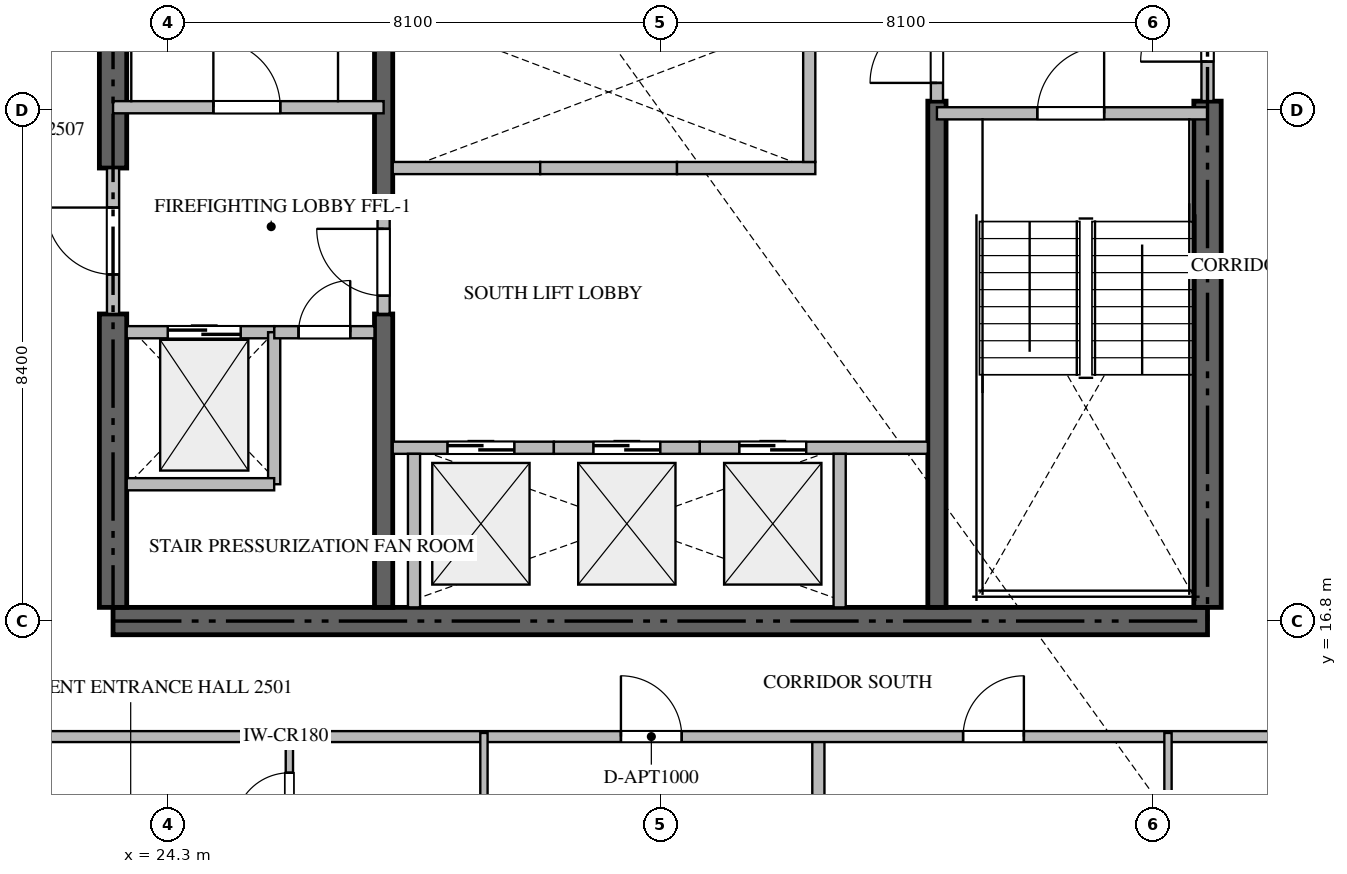
"""IFC4 building model, lengths in metres.
Left out: names, types, materials, properties, quantities, classifications, styles, units other than length and angle.
Written with IfcOpenShell. Run it as: python <this file> out.ifc"""

import sys

from ifc_helpers import new_model, si_unit, direction, frame, frame_2d, origin, place, context, subcontext, project, spatial, rectangle, extrude, source, transform, mapped, element, fill, save


model = new_model("IFC4")
c1 = context("Model", 3, precision=1e-05, world=origin(), true_north=direction((0.0, 1.0)))
c2 = subcontext(c1, "Body", "Model", "MODEL_VIEW")
j1 = project(units=[si_unit("LENGTHUNIT", "METRE"), si_unit("PLANEANGLEUNIT", "RADIAN")], contexts=[c1])
p1 = place(None, origin())
s1 = spatial("IfcSite", under=j1, at=p1, CompositionType="ELEMENT")
p2 = place(p1, origin())
s2 = spatial("IfcBuilding", under=s1, at=p2, CompositionType="ELEMENT")
p3 = place(p2, frame((0.0, 0.0, 101.7)))
s3 = spatial("IfcBuildingStorey", under=s2, at=p3, CompositionType="ELEMENT", Elevation=101.7)
p4 = place(p3, frame((23.4, 16.8, -0.26), z_axis=(0.0, 0.0, 1.0), x_axis=(1.0, 0.0, 0.0)))
e1 = element("IfcWall", 1, at=p4, inside=s3, PredefinedType="SHEAR", context=c2, shape_type="SweptSolid", body=[
    extrude(rectangle(XDim=18.0, YDim=0.45, at=frame_2d((9.0, 0.0))), origin(), (0.0, 0.0, 1.0), 3.748),
])
p5 = place(p3, frame((23.4, 17.025, -0.26), z_axis=(0.0, 0.0, 1.0), x_axis=(0.0, 1.0, 0.0)))
e2 = element("IfcWall", 2, at=p5, inside=s3, PredefinedType="SHEAR", context=c2, shape_type="SweptSolid", body=[
    extrude(rectangle(XDim=4.825, YDim=0.45, at=frame_2d((2.413, 0.0))), origin(), (0.0, 0.0, 1.0), 3.748),
])
p6 = place(p3, frame((23.4, 24.25, -0.26), z_axis=(0.0, 0.0, 1.0), x_axis=(0.0, 1.0, 0.0)))
e3 = element("IfcWall", 3, at=p6, inside=s3, PredefinedType="SHEAR", context=c2, shape_type="SweptSolid", body=[
    extrude(rectangle(XDim=9.125, YDim=0.45, at=frame_2d((4.562, 0.0))), origin(), (0.0, 0.0, 1.0), 3.748),
])
p7 = place(p3, frame((41.4, 17.025, -0.26), z_axis=(0.0, 0.0, 1.0), x_axis=(0.0, 1.0, 0.0)))
e4 = element("IfcWall", 4, at=p7, inside=s3, PredefinedType="SHEAR", context=c2, shape_type="SweptSolid", body=[
    extrude(rectangle(XDim=8.325, YDim=0.45, at=frame_2d((4.163, 0.0))), origin(), (0.0, 0.0, 1.0), 3.748),
])
p8 = place(p3, frame((27.85, 17.025, -0.26), z_axis=(0.0, 0.0, 1.0), x_axis=(0.0, 1.0, 0.0)))
e5 = element("IfcWall", 5, at=p8, inside=s3, PredefinedType="SHEAR", context=c2, shape_type="SweptSolid", body=[
    extrude(rectangle(XDim=4.825, YDim=0.3, at=frame_2d((2.413, 0.0))), origin(), (0.0, 0.0, 1.0), 3.748),
])
p9 = place(p3, frame((27.85, 23.55, -0.26), z_axis=(0.0, 0.0, 1.0), x_axis=(0.0, 1.0, 0.0)))
e6 = element("IfcWall", 6, at=p9, inside=s3, PredefinedType="SHEAR", context=c2, shape_type="SweptSolid", body=[
    extrude(rectangle(XDim=9.825, YDim=0.3, at=frame_2d((4.913, 0.0))), origin(), (0.0, 0.0, 1.0), 3.748),
])
p10 = place(p3, frame((36.95, 17.025, -0.26), z_axis=(0.0, 0.0, 1.0), x_axis=(0.0, 1.0, 0.0)))
e7 = element("IfcWall", 7, at=p10, inside=s3, PredefinedType="SHEAR", context=c2, shape_type="SweptSolid", body=[
    extrude(rectangle(XDim=8.325, YDim=0.3, at=frame_2d((4.163, 0.0))), origin(), (0.0, 0.0, 1.0), 3.748),
])
p11 = place(p3, frame((23.4, 25.25, 0.0), z_axis=(0.0, 0.0, 1.0), x_axis=(1.0, 0.0, 0.0)))
e8 = element("IfcWall", 8, at=p11, inside=s3, PredefinedType="STANDARD", context=c2, shape_type="SweptSolid", body=[
    extrude(rectangle(XDim=4.45, YDim=0.2, at=frame_2d((2.225, 0.0))), origin(), (0.0, 0.0, 1.0), 3.49),
])
p12 = place(p11, frame((1.65, 0.0, 0.0)))
e9 = element("IfcOpeningElement", 9, at=p12, cuts=e8, PredefinedType="OPENING", context=c2, shape_type="SweptSolid", body=[
    extrude(rectangle(XDim=1.1, YDim=2.15, at=frame_2d((0.55, 1.075))), frame((0.0, 0.11, 0.0), z_axis=(0.0, -1.0, 0.0), x_axis=(1.0, 0.0, 0.0)), (0.0, 0.0, 1.0), 0.22),
])
p13 = place(p3, frame((36.95, 25.15, 0.0), z_axis=(0.0, 0.0, 1.0), x_axis=(1.0, 0.0, 0.0)))
e10 = element("IfcWall", 10, at=p13, inside=s3, PredefinedType="STANDARD", context=c2, shape_type="SweptSolid", body=[
    extrude(rectangle(XDim=4.45, YDim=0.2, at=frame_2d((2.225, 0.0))), origin(), (0.0, 0.0, 1.0), 3.49),
])
p14 = place(p13, frame((1.65, 0.0, 0.0)))
e11 = element("IfcOpeningElement", 11, at=p14, cuts=e10, PredefinedType="OPENING", context=c2, shape_type="SweptSolid", body=[
    extrude(rectangle(XDim=1.1, YDim=2.15, at=frame_2d((0.55, 1.075))), frame((0.0, 0.11, 0.0), z_axis=(0.0, -1.0, 0.0), x_axis=(1.0, 0.0, 0.0)), (0.0, 0.0, 1.0), 0.22),
])
p15 = place(p3, frame((23.625, 21.55, 0.0), z_axis=(0.0, 0.0, 1.0), x_axis=(1.0, 0.0, 0.0)))
e12 = element("IfcWall", 12, at=p15, inside=s3, PredefinedType="STANDARD", context=c2, shape_type="SweptSolid", body=[
    extrude(rectangle(XDim=2.425, YDim=0.2, at=frame_2d((1.212, 0.0))), origin(), (0.0, 0.0, 1.0), 3.49),
])
p16 = place(p15, frame((0.675, 0.0, 0.0)))
e13 = element("IfcOpeningElement", 13, at=p16, cuts=e12, PredefinedType="OPENING", context=c2, shape_type="SweptSolid", body=[
    extrude(rectangle(XDim=1.2, YDim=2.2, at=frame_2d((0.6, 1.1))), frame((0.0, 0.11, 0.0), z_axis=(0.0, -1.0, 0.0), x_axis=(1.0, 0.0, 0.0)), (0.0, 0.0, 1.0), 0.22),
])
p17 = place(p3, frame((28.0, 19.65, 0.0), z_axis=(0.0, 0.0, 1.0), x_axis=(1.0, 0.0, 0.0)))
e14 = element("IfcWall", 14, at=p17, inside=s3, PredefinedType="STANDARD", context=c2, shape_type="SweptSolid", body=[
    extrude(rectangle(XDim=2.65, YDim=0.2, at=frame_2d((1.325, 0.0))), origin(), (0.0, 0.0, 1.0), 3.49),
])
p18 = place(p17, frame((0.9, 0.0, 0.0)))
e15 = element("IfcOpeningElement", 15, at=p18, cuts=e14, PredefinedType="OPENING", context=c2, shape_type="SweptSolid", body=[
    extrude(rectangle(XDim=1.1, YDim=2.2, at=frame_2d((0.55, 1.1))), frame((0.0, 0.11, 0.0), z_axis=(0.0, -1.0, 0.0), x_axis=(1.0, 0.0, 0.0)), (0.0, 0.0, 1.0), 0.22),
])
p19 = place(p3, frame((28.35, 17.025, 0.0), z_axis=(0.0, 0.0, 1.0), x_axis=(0.0, 1.0, 0.0)))
e16 = element("IfcWall", 16, at=p19, inside=s3, PredefinedType="STANDARD", context=c2, shape_type="SweptSolid", body=[
    extrude(rectangle(XDim=2.525, YDim=0.2, at=frame_2d((1.263, 0.0))), origin(), (0.0, 0.0, 1.0), 3.49),
])
p20 = place(p3, frame((30.65, 19.65, 0.0), z_axis=(0.0, 0.0, 1.0), x_axis=(1.0, 0.0, 0.0)))
e17 = element("IfcWall", 17, at=p20, inside=s3, PredefinedType="STANDARD", context=c2, shape_type="SweptSolid", body=[
    extrude(rectangle(XDim=2.4, YDim=0.2, at=frame_2d((1.2, 0.0))), origin(), (0.0, 0.0, 1.0), 3.49),
])
p21 = place(p20, frame((0.65, 0.0, 0.0)))
e18 = element("IfcOpeningElement", 18, at=p21, cuts=e17, PredefinedType="OPENING", context=c2, shape_type="SweptSolid", body=[
    extrude(rectangle(XDim=1.1, YDim=2.2, at=frame_2d((0.55, 1.1))), frame((0.0, 0.11, 0.0), z_axis=(0.0, -1.0, 0.0), x_axis=(1.0, 0.0, 0.0)), (0.0, 0.0, 1.0), 0.22),
])
p22 = place(p3, frame((33.05, 19.65, 0.0), z_axis=(0.0, 0.0, 1.0), x_axis=(1.0, 0.0, 0.0)))
e19 = element("IfcWall", 19, at=p22, inside=s3, PredefinedType="STANDARD", context=c2, shape_type="SweptSolid", body=[
    extrude(rectangle(XDim=3.75, YDim=0.2, at=frame_2d((1.875, 0.0))), origin(), (0.0, 0.0, 1.0), 3.49),
])
p23 = place(p22, frame((0.65, 0.0, 0.0)))
e20 = element("IfcOpeningElement", 20, at=p23, cuts=e19, PredefinedType="OPENING", context=c2, shape_type="SweptSolid", body=[
    extrude(rectangle(XDim=1.1, YDim=2.2, at=frame_2d((0.55, 1.1))), frame((0.0, 0.11, 0.0), z_axis=(0.0, -1.0, 0.0), x_axis=(1.0, 0.0, 0.0)), (0.0, 0.0, 1.0), 0.22),
])
p24 = place(p3, frame((35.35, 17.025, 0.0), z_axis=(0.0, 0.0, 1.0), x_axis=(0.0, 1.0, 0.0)))
e21 = element("IfcWall", 21, at=p24, inside=s3, PredefinedType="STANDARD", context=c2, shape_type="SweptSolid", body=[
    extrude(rectangle(XDim=2.525, YDim=0.2, at=frame_2d((1.263, 0.0))), origin(), (0.0, 0.0, 1.0), 3.49),
])
p25 = place(p3, frame((28.0, 24.25, 0.0), z_axis=(0.0, 0.0, 1.0), x_axis=(1.0, 0.0, 0.0)))
e22 = element("IfcWall", 22, at=p25, inside=s3, PredefinedType="STANDARD", context=c2, shape_type="SweptSolid", body=[
    extrude(rectangle(XDim=2.425, YDim=0.2, at=frame_2d((1.212, 0.0))), origin(), (0.0, 0.0, 1.0), 3.49),
])
p26 = place(p3, frame((30.425, 24.25, 0.0), z_axis=(0.0, 0.0, 1.0), x_axis=(1.0, 0.0, 0.0)))
e23 = element("IfcWall", 23, at=p26, inside=s3, PredefinedType="STANDARD", context=c2, shape_type="SweptSolid", body=[
    extrude(rectangle(XDim=2.25, YDim=0.2, at=frame_2d((1.125, 0.0))), origin(), (0.0, 0.0, 1.0), 3.49),
])
p27 = place(p3, frame((32.675, 24.25, 0.0), z_axis=(0.0, 0.0, 1.0), x_axis=(1.0, 0.0, 0.0)))
e24 = element("IfcWall", 24, at=p27, inside=s3, PredefinedType="STANDARD", context=c2, shape_type="SweptSolid", body=[
    extrude(rectangle(XDim=2.275, YDim=0.2, at=frame_2d((1.137, 0.0))), origin(), (0.0, 0.0, 1.0), 3.49),
])
for number, where, z_axis, x_axis in (
    (25, (34.85, 24.35, 0.0), (0.0, 0.0, 1.0), (0.0, 1.0, 0.0)),
    (26, (26.05, 19.05, 0.0), (0.0, 0.0, 1.0), (0.0, 1.0, 0.0)),
):
    element("IfcWall", number, at=place(p3, frame(where, z_axis=z_axis, x_axis=x_axis)), inside=s3, PredefinedType="STANDARD", context=c2, shape_type="SweptSolid", body=[
        extrude(rectangle(XDim=2.5, YDim=0.2, at=frame_2d((1.25, 0.0))), origin(), (0.0, 0.0, 1.0), 3.49),
    ])
p28 = place(p3, frame((23.625, 19.05, 0.0), z_axis=(0.0, 0.0, 1.0), x_axis=(1.0, 0.0, 0.0)))
e27 = element("IfcWall", 27, at=p28, inside=s3, PredefinedType="STANDARD", context=c2, shape_type="SweptSolid", body=[
    extrude(rectangle(XDim=2.425, YDim=0.2, at=frame_2d((1.212, 0.0))), origin(), (0.0, 0.0, 1.0), 3.49),
])
p29 = place(p3, frame((26.052, 21.55, 0.0), z_axis=(0.0, 0.0, 1.0), x_axis=(1.0, 0.0, 0.0)))
e28 = element("IfcWall", 28, at=p29, inside=s3, PredefinedType="STANDARD", context=c2, shape_type="SweptSolid", body=[
    extrude(rectangle(XDim=1.648, YDim=0.2, at=frame_2d((0.824, 0.0))), origin(), (0.0, 0.0, 1.0), 3.49),
])
p30 = place(p29, frame((0.399, 0.0, 0.0)))
e29 = element("IfcOpeningElement", 29, at=p30, cuts=e28, PredefinedType="OPENING", context=c2, shape_type="SweptSolid", body=[
    extrude(rectangle(XDim=0.85, YDim=2.1, at=frame_2d((0.425, 1.05))), frame((0.0, 0.11, 0.0), z_axis=(0.0, -1.0, 0.0), x_axis=(1.0, 0.0, 0.0)), (0.0, 0.0, 1.0), 0.22),
])
p31 = place(p3, frame((23.4, 21.852, 0.0), z_axis=(0.0, 0.0, 1.0), x_axis=(0.0, 1.0, 0.0)))
e30 = element("IfcWall", 30, at=p31, inside=s3, PredefinedType="STANDARD", context=c2, shape_type="SweptSolid", body=[
    extrude(rectangle(XDim=2.396, YDim=0.2, at=frame_2d((1.198, 0.0))), origin(), (0.0, 0.0, 1.0), 3.49),
])
p32 = place(p31, frame((0.648, 0.0, 0.0)))
e31 = element("IfcOpeningElement", 31, at=p32, cuts=e30, PredefinedType="OPENING", context=c2, shape_type="SweptSolid", body=[
    extrude(rectangle(XDim=1.1, YDim=2.15, at=frame_2d((0.55, 1.075))), frame((0.0, 0.11, 0.0), z_axis=(0.0, -1.0, 0.0), x_axis=(1.0, 0.0, 0.0)), (0.0, 0.0, 1.0), 0.22),
])
p33 = place(p3, frame((41.4, 25.352, 0.0), z_axis=(0.0, 0.0, 1.0), x_axis=(0.0, 1.0, 0.0)))
e32 = element("IfcWall", 32, at=p33, inside=s3, PredefinedType="STANDARD", context=c2, shape_type="SweptSolid", body=[
    extrude(rectangle(XDim=2.396, YDim=0.2, at=frame_2d((1.198, 0.0))), origin(), (0.0, 0.0, 1.0), 3.49),
])
p34 = place(p33, frame((0.648, 0.0, 0.0)))
e33 = element("IfcOpeningElement", 33, at=p34, cuts=e32, PredefinedType="OPENING", context=c2, shape_type="SweptSolid", body=[
    extrude(rectangle(XDim=1.1, YDim=2.15, at=frame_2d((0.55, 1.075))), frame((0.0, 0.11, 0.0), z_axis=(0.0, -1.0, 0.0), x_axis=(1.0, 0.0, 0.0)), (0.0, 0.0, 1.0), 0.22),
])
p35 = place(p3, frame((27.85, 21.852, 0.0), z_axis=(0.0, 0.0, 1.0), x_axis=(0.0, 1.0, 0.0)))
e34 = element("IfcWall", 34, at=p35, inside=s3, PredefinedType="STANDARD", context=c2, shape_type="SweptSolid", body=[
    extrude(rectangle(XDim=1.696, YDim=0.2, at=frame_2d((0.848, 0.0))), origin(), (0.0, 0.0, 1.0), 3.49),
])
p36 = place(p35, frame((0.298, 0.0, 0.0)))
e35 = element("IfcOpeningElement", 35, at=p36, cuts=e34, PredefinedType="OPENING", context=c2, shape_type="SweptSolid", body=[
    extrude(rectangle(XDim=1.1, YDim=2.15, at=frame_2d((0.55, 1.075))), frame((0.0, 0.11, 0.0), z_axis=(0.0, -1.0, 0.0), x_axis=(1.0, 0.0, 0.0)), (0.0, 0.0, 1.0), 0.22),
])
p37 = place(p3, frame((36.95, 25.352, 0.0), z_axis=(0.0, 0.0, 1.0), x_axis=(0.0, 1.0, 0.0)))
e36 = element("IfcWall", 36, at=p37, inside=s3, PredefinedType="STANDARD", context=c2, shape_type="SweptSolid", body=[
    extrude(rectangle(XDim=1.696, YDim=0.2, at=frame_2d((0.848, 0.0))), origin(), (0.0, 0.0, 1.0), 3.49),
])
p38 = place(p37, frame((0.298, 0.0, 0.0)))
e37 = element("IfcOpeningElement", 37, at=p38, cuts=e36, PredefinedType="OPENING", context=c2, shape_type="SweptSolid", body=[
    extrude(rectangle(XDim=1.1, YDim=2.15, at=frame_2d((0.55, 1.075))), frame((0.0, 0.11, 0.0), z_axis=(0.0, -1.0, 0.0), x_axis=(1.0, 0.0, 0.0)), (0.0, 0.0, 1.0), 0.22),
])
p39 = place(p3, frame((35.0, 0.282, 0.0), z_axis=(0.0, 0.0, 1.0), x_axis=(0.0, 1.0, 0.0)))
e38 = element("IfcWall", 38, at=p39, inside=s3, PredefinedType="PARTITIONING", context=c2, shape_type="SweptSolid", body=[
    extrude(rectangle(XDim=14.618, YDim=0.2, at=frame_2d((7.309, 0.0))), origin(), (0.0, 0.0, 1.0), 3.49),
])
p40 = place(p3, frame((21.402, 14.9, 0.0), z_axis=(0.0, 0.0, 1.0), x_axis=(1.0, 0.0, 0.0)))
e39 = element("IfcWall", 39, at=p40, inside=s3, PredefinedType="PARTITIONING", context=c2, shape_type="SweptSolid", body=[
    extrude(rectangle(XDim=21.996, YDim=0.18, at=frame_2d((10.998, 0.0))), origin(), (0.0, 0.0, 1.0), 3.49),
])
p41 = place(p40, frame((10.351, 0.0, 0.0)))
e40 = element("IfcOpeningElement", 40, at=p41, cuts=e39, PredefinedType="OPENING", context=c2, shape_type="SweptSolid", body=[
    extrude(rectangle(XDim=1.0, YDim=2.15, at=frame_2d((0.5, 1.075))), frame((0.0, 0.1, 0.0), z_axis=(0.0, -1.0, 0.0), x_axis=(1.0, 0.0, 0.0)), (0.0, 0.0, 1.0), 0.2),
])
p42 = place(p40, frame((15.978, 0.0, 0.0)))
e41 = element("IfcOpeningElement", 41, at=p42, cuts=e39, PredefinedType="OPENING", context=c2, shape_type="SweptSolid", body=[
    extrude(rectangle(XDim=1.0, YDim=2.15, at=frame_2d((0.5, 1.075))), frame((0.0, 0.1, 0.0), z_axis=(0.0, -1.0, 0.0), x_axis=(1.0, 0.0, 0.0)), (0.0, 0.0, 1.0), 0.2),
])
p43 = place(p3, frame((29.5, 12.15, 0.0), z_axis=(0.0, 0.0, 1.0), x_axis=(0.0, 1.0, 0.0)))
e42 = element("IfcWall", 42, at=p43, inside=s3, PredefinedType="PARTITIONING", context=c2, shape_type="SweptSolid", body=[
    extrude(rectangle(XDim=2.81, YDim=0.12, at=frame_2d((1.405, 0.0))), origin(), (0.0, 0.0, 1.0), 3.49),
])
p44 = place(p3, frame((26.3, 12.75, 0.0), z_axis=(0.0, 0.0, 1.0), x_axis=(0.0, 1.0, 0.0)))
e43 = element("IfcWall", 43, at=p44, inside=s3, PredefinedType="PARTITIONING", context=c2, shape_type="SweptSolid", body=[
    extrude(rectangle(XDim=2.21, YDim=0.12, at=frame_2d((1.105, 0.0))), origin(), (0.0, 0.0, 1.0), 3.49),
])
p45 = place(p44, frame((0.655, 0.0, 0.0)))
e44 = element("IfcOpeningElement", 44, at=p45, cuts=e43, PredefinedType="OPENING", context=c2, shape_type="SweptSolid", body=[
    extrude(rectangle(XDim=0.9, YDim=2.1, at=frame_2d((0.45, 1.05))), frame((0.0, 0.07, 0.0), z_axis=(0.0, -1.0, 0.0), x_axis=(1.0, 0.0, 0.0)), (0.0, 0.0, 1.0), 0.14),
])
p46 = place(p3, frame((40.75, 12.15, 0.0), z_axis=(0.0, 0.0, 1.0), x_axis=(0.0, 1.0, 0.0)))
e45 = element("IfcWall", 45, at=p46, inside=s3, PredefinedType="PARTITIONING", context=c2, shape_type="SweptSolid", body=[
    extrude(rectangle(XDim=2.81, YDim=0.12, at=frame_2d((1.405, 0.0))), origin(), (0.0, 0.0, 1.0), 3.49),
])
m1 = source(origin(), c2, "Body", "SweptSolid", [
    extrude(rectangle(XDim=1.1, YDim=2.15, at=frame_2d((0.55, 1.075))), frame((0.0, 0.025, 0.0), z_axis=(0.0, -1.0, 0.0), x_axis=(1.0, 0.0, 0.0)), (0.0, 0.0, 1.0), 0.05),
])
p47 = place(p12, origin())
e46 = element("IfcDoor", 46, at=p47, inside=s3, OperationType="SINGLE_SWING_LEFT", PredefinedType="DOOR", context=c2, shape_type="MappedRepresentation", body=[
    mapped(m1, transform((0.0, 0.0, 0.0), scale=1.0)),
])
fill(e9, e46)
p48 = place(p14, origin())
e47 = element("IfcDoor", 47, at=p48, inside=s3, OperationType="SINGLE_SWING_RIGHT", PredefinedType="DOOR", context=c2, shape_type="MappedRepresentation", body=[
    mapped(m1, transform((0.0, 0.0, 0.0), scale=1.0)),
])
fill(e11, e47)
m2 = source(origin(), c2, "Body", "SweptSolid", [
    extrude(rectangle(XDim=1.2, YDim=2.2, at=frame_2d((0.6, 1.1))), frame((0.0, 0.025, 0.0), z_axis=(0.0, -1.0, 0.0), x_axis=(1.0, 0.0, 0.0)), (0.0, 0.0, 1.0), 0.05),
])
p49 = place(p16, origin())
e48 = element("IfcDoor", 48, at=p49, inside=s3, OperationType="DOUBLE_DOOR_SLIDING", PredefinedType="DOOR", context=c2, shape_type="MappedRepresentation", body=[
    mapped(m2, transform((0.0, 0.0, 0.0), scale=1.0)),
])
fill(e13, e48)
m3 = source(origin(), c2, "Body", "SweptSolid", [
    extrude(rectangle(XDim=1.1, YDim=2.2, at=frame_2d((0.55, 1.1))), frame((0.0, 0.025, 0.0), z_axis=(0.0, -1.0, 0.0), x_axis=(1.0, 0.0, 0.0)), (0.0, 0.0, 1.0), 0.05),
])
p50 = place(p18, origin())
e49 = element("IfcDoor", 49, at=p50, inside=s3, OperationType="DOUBLE_DOOR_SLIDING", PredefinedType="DOOR", context=c2, shape_type="MappedRepresentation", body=[
    mapped(m3, transform((0.0, 0.0, 0.0), scale=1.0)),
])
fill(e15, e49)
p51 = place(p21, origin())
e50 = element("IfcDoor", 50, at=p51, inside=s3, OperationType="DOUBLE_DOOR_SLIDING", PredefinedType="DOOR", context=c2, shape_type="MappedRepresentation", body=[
    mapped(m3, transform((0.0, 0.0, 0.0), scale=1.0)),
])
fill(e18, e50)
p52 = place(p23, origin())
e51 = element("IfcDoor", 51, at=p52, inside=s3, OperationType="DOUBLE_DOOR_SLIDING", PredefinedType="DOOR", context=c2, shape_type="MappedRepresentation", body=[
    mapped(m3, transform((0.0, 0.0, 0.0), scale=1.0)),
])
fill(e20, e51)
m4 = source(origin(), c2, "Body", "SweptSolid", [
    extrude(rectangle(XDim=0.85, YDim=2.1, at=frame_2d((0.425, 1.05))), frame((0.0, 0.025, 0.0), z_axis=(0.0, -1.0, 0.0), x_axis=(1.0, 0.0, 0.0)), (0.0, 0.0, 1.0), 0.05),
])
p53 = place(p30, origin())
e52 = element("IfcDoor", 52, at=p53, inside=s3, OperationType="SINGLE_SWING_RIGHT", PredefinedType="DOOR", context=c2, shape_type="MappedRepresentation", body=[
    mapped(m4, transform((0.0, 0.0, 0.0), scale=1.0)),
])
fill(e29, e52)
p54 = place(p32, origin())
e53 = element("IfcDoor", 53, at=p54, inside=s3, OperationType="SINGLE_SWING_RIGHT", PredefinedType="DOOR", context=c2, shape_type="MappedRepresentation", body=[
    mapped(m1, transform((0.0, 0.0, 0.0), scale=1.0)),
])
fill(e31, e53)
p55 = place(p34, origin())
e54 = element("IfcDoor", 54, at=p55, inside=s3, OperationType="SINGLE_SWING_LEFT", PredefinedType="DOOR", context=c2, shape_type="MappedRepresentation", body=[
    mapped(m1, transform((0.0, 0.0, 0.0), scale=1.0)),
])
fill(e33, e54)
p56 = place(p36, origin())
e55 = element("IfcDoor", 55, at=p56, inside=s3, OperationType="SINGLE_SWING_RIGHT", PredefinedType="DOOR", context=c2, shape_type="MappedRepresentation", body=[
    mapped(m1, transform((0.0, 0.0, 0.0), scale=1.0)),
])
fill(e35, e55)
p57 = place(p38, origin())
e56 = element("IfcDoor", 56, at=p57, inside=s3, OperationType="SINGLE_SWING_LEFT", PredefinedType="DOOR", context=c2, shape_type="MappedRepresentation", body=[
    mapped(m1, transform((0.0, 0.0, 0.0), scale=1.0)),
])
fill(e37, e56)
m5 = source(origin(), c2, "Body", "SweptSolid", [
    extrude(rectangle(XDim=1.0, YDim=2.15, at=frame_2d((0.5, 1.075))), frame((0.0, 0.025, 0.0), z_axis=(0.0, -1.0, 0.0), x_axis=(1.0, 0.0, 0.0)), (0.0, 0.0, 1.0), 0.05),
])
p58 = place(p41, origin())
e57 = element("IfcDoor", 57, at=p58, inside=s3, OperationType="SINGLE_SWING_LEFT", PredefinedType="DOOR", context=c2, shape_type="MappedRepresentation", body=[
    mapped(m5, transform((0.0, 0.0, 0.0), scale=1.0)),
])
fill(e40, e57)
p59 = place(p42, origin())
e58 = element("IfcDoor", 58, at=p59, inside=s3, OperationType="SINGLE_SWING_RIGHT", PredefinedType="DOOR", context=c2, shape_type="MappedRepresentation", body=[
    mapped(m5, transform((0.0, 0.0, 0.0), scale=1.0)),
])
fill(e41, e58)
m6 = source(origin(), c2, "Body", "SweptSolid", [
    extrude(rectangle(XDim=0.9, YDim=2.1, at=frame_2d((0.45, 1.05))), frame((0.0, 0.025, 0.0), z_axis=(0.0, -1.0, 0.0), x_axis=(1.0, 0.0, 0.0)), (0.0, 0.0, 1.0), 0.05),
])
p60 = place(p45, origin())
e59 = element("IfcDoor", 59, at=p60, inside=s3, OperationType="SINGLE_SWING_LEFT", PredefinedType="DOOR", context=c2, shape_type="MappedRepresentation", body=[
    mapped(m6, transform((0.0, 0.0, 0.0), scale=1.0)),
])
fill(e44, e59)
save(model, sys.argv[1])
